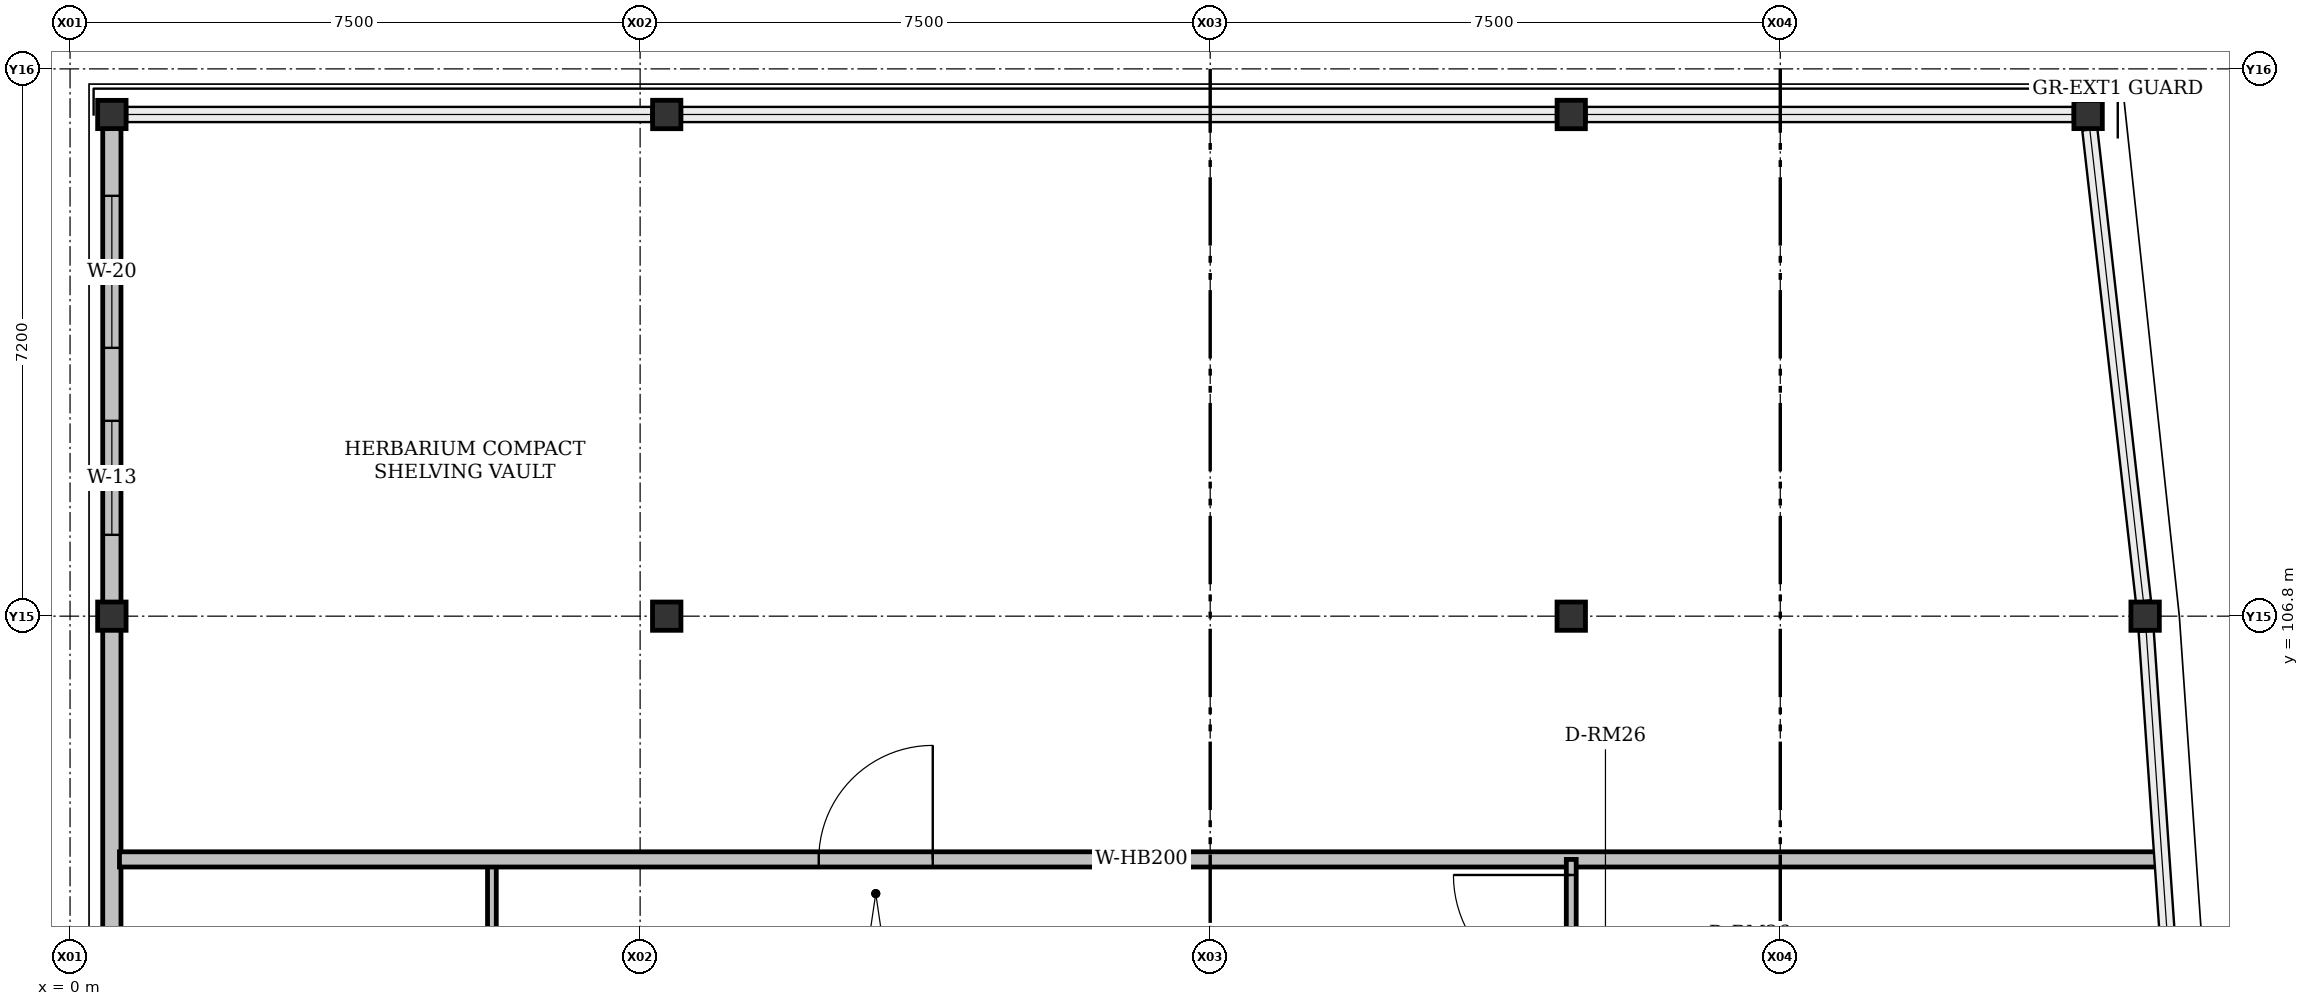
"""IFC4 building model, lengths in metres.
Left out: names, types, materials, properties, quantities, classifications, styles, units other than length and angle.
Written with IfcOpenShell. Run it as: python <this file> out.ifc"""

import sys

from ifc_helpers import new_model, si_unit, direction, frame, frame_2d, origin, origin_2d, place, context, subcontext, project, spatial, rectangle, i_section, extrude, element, fill, save


model = new_model("IFC4")
c1 = context("Model", 3, precision=1e-05, world=origin(), true_north=direction((0.0, 1.0)))
c2 = subcontext(c1, "Body", "Model", "MODEL_VIEW")
j1 = project(units=[si_unit("LENGTHUNIT", "METRE"), si_unit("PLANEANGLEUNIT", "RADIAN")], contexts=[c1])
p1 = place(None, origin())
s1 = spatial("IfcSite", under=j1, at=p1, CompositionType="ELEMENT")
p2 = place(p1, origin())
s2 = spatial("IfcBuilding", under=s1, at=p2, CompositionType="ELEMENT")
p3 = place(p2, frame((0.0, 0.0, 26.7)))
s3 = spatial("IfcBuildingStorey", under=s2, at=p3, CompositionType="ELEMENT", Elevation=26.7)
for number, where, z_axis, x_axis in (
    (1, (0.55, 106.8, 0.0), (0.0, 0.0, 1.0), (1.0, 0.0, 0.0)),
    (2, (7.85, 106.8, 0.0), (0.0, 0.0, 1.0), (1.0, 0.0, 0.0)),
    (3, (19.75, 106.8, 0.0), (0.0, 0.0, 1.0), (1.0, 0.0, 0.0)),
    (4, (27.3, 106.8, 0.0), (0.0, 0.0, 1.0), (1.0, 0.0, 0.0)),
    (5, (0.55, 113.4, 0.0), (0.0, 0.0, 1.0), (1.0, 0.0, 0.0)),
    (6, (7.85, 113.4, 0.0), (0.0, 0.0, 1.0), (0.0, 1.0, 0.0)),
    (7, (19.75, 113.4, 0.0), (0.0, 0.0, 1.0), (0.0, 1.0, 0.0)),
    (8, (26.55, 113.4, 0.0), (0.0, 0.0, 1.0), (1.0, 0.0, 0.0)),
):
    element("IfcColumn", number, at=place(p3, frame(where, z_axis=z_axis, x_axis=x_axis)), inside=s3, PredefinedType="COLUMN", context=c2, shape_type="SweptSolid", body=[
        extrude(i_section(OverallWidth=0.374, OverallDepth=0.372, WebThickness=0.016, FlangeThickness=0.026, FilletRadius=0.015, at=origin_2d()), origin(), (0.0, 0.0, 1.0), 4.2),
    ])
p4 = place(p3, frame((0.55, 99.6, 0.0), z_axis=(0.0, 0.0, 1.0), x_axis=(0.0, 1.0, 0.0)))
e9 = element("IfcWall", 9, at=p4, inside=s3, PredefinedType="SOLIDWALL", context=c2, shape_type="SweptSolid", body=[
    extrude(rectangle(XDim=7.2, YDim=0.24, at=frame_2d((3.6, 0.0))), origin(), (0.0, 0.0, 1.0), 3.557),
])
p5 = place(p3, frame((0.55, 106.8, 0.0), z_axis=(0.0, 0.0, 1.0), x_axis=(0.0, 1.0, 0.0)))
e10 = element("IfcWall", 10, at=p5, inside=s3, PredefinedType="SOLIDWALL", context=c2, shape_type="SweptSolid", body=[
    extrude(rectangle(XDim=6.6, YDim=0.24, at=frame_2d((3.3, 0.0))), origin(), (0.0, 0.0, 1.0), 3.557),
])
p6 = place(p5, frame((1.07, 0.0, 0.92)))
e11 = element("IfcOpeningElement", 11, at=p6, cuts=e10, PredefinedType="OPENING", context=c2, shape_type="SweptSolid", body=[
    extrude(rectangle(XDim=1.5, YDim=1.7, at=frame_2d((0.75, 0.85))), frame((0.0, 0.12, 0.0), z_axis=(0.0, -1.0, 0.0), x_axis=(1.0, 0.0, 0.0)), (0.0, 0.0, 1.0), 0.24),
])
p7 = place(p5, frame((3.53, 0.0, 0.92)))
e12 = element("IfcOpeningElement", 12, at=p7, cuts=e10, PredefinedType="OPENING", context=c2, shape_type="SweptSolid", body=[
    extrude(rectangle(XDim=2.0, YDim=1.35, at=frame_2d((1.0, 0.675))), frame((0.0, 0.12, 0.0), z_axis=(0.0, -1.0, 0.0), x_axis=(1.0, 0.0, 0.0)), (0.0, 0.0, 1.0), 0.24),
])
p8 = place(p3, frame((5.55, 85.2, 0.0), z_axis=(0.0, 0.0, 1.0), x_axis=(0.0, 1.0, 0.0)))
e13 = element("IfcWall", 13, at=p8, inside=s3, PredefinedType="PARTITIONING", context=c2, shape_type="SweptSolid", body=[
    extrude(rectangle(XDim=18.4, YDim=0.115, at=frame_2d((9.2, 0.0))), origin(), (0.0, 0.0, 1.0), 3.277),
])
p9 = place(p8, frame((8.56, 0.0, 0.0)))
e14 = element("IfcOpeningElement", 14, at=p9, cuts=e13, PredefinedType="OPENING", context=c2, shape_type="SweptSolid", body=[
    extrude(rectangle(XDim=1.28, YDim=2.25, at=frame_2d((0.64, 1.125))), frame((0.0, 0.058, 0.0), z_axis=(0.0, -1.0, 0.0), x_axis=(1.0, 0.0, 0.0)), (0.0, 0.0, 1.0), 0.115),
])
p10 = place(p8, frame((10.69, 0.0, 0.92)))
e15 = element("IfcOpeningElement", 15, at=p10, cuts=e13, PredefinedType="OPENING", context=c2, shape_type="SweptSolid", body=[
    extrude(rectangle(XDim=1.05, YDim=1.2, at=frame_2d((0.525, 0.6))), frame((0.0, 0.058, 0.0), z_axis=(0.0, -1.0, 0.0), x_axis=(1.0, 0.0, 0.0)), (0.0, 0.0, 1.0), 0.115),
])
p11 = place(p3, frame((0.65, 103.6, 0.0), z_axis=(0.0, 0.0, 1.0), x_axis=(1.0, 0.0, 0.0)))
e16 = element("IfcWall", 16, at=p11, inside=s3, PredefinedType="SOLIDWALL", context=c2, shape_type="SweptSolid", body=[
    extrude(rectangle(XDim=26.89, YDim=0.2, at=frame_2d((13.445, 0.0))), origin(), (0.0, 0.0, 1.0), 3.507),
])
p12 = place(p11, frame((9.2, 0.0, 0.0)))
e17 = element("IfcOpeningElement", 17, at=p12, cuts=e16, PredefinedType="OPENING", context=c2, shape_type="SweptSolid", body=[
    extrude(rectangle(XDim=1.5, YDim=2.3, at=frame_2d((0.75, 1.15))), frame((0.0, 0.1, 0.0), z_axis=(0.0, -1.0, 0.0), x_axis=(1.0, 0.0, 0.0)), (0.0, 0.0, 1.0), 0.2),
])
p13 = place(p3, frame((19.75, 99.782, 0.0), z_axis=(0.0, 0.0, 1.0), x_axis=(0.0, 1.0, 0.0)))
e18 = element("IfcWall", 18, at=p13, inside=s3, PredefinedType="PARTITIONING", context=c2, shape_type="SweptSolid", body=[
    extrude(rectangle(XDim=3.818, YDim=0.13, at=frame_2d((1.909, 0.0))), origin(), (0.0, 0.0, 1.0), 3.507),
])
p14 = place(p13, frame((2.063, 0.0, 0.0)))
e19 = element("IfcOpeningElement", 19, at=p14, cuts=e18, PredefinedType="OPENING", context=c2, shape_type="SweptSolid", body=[
    extrude(rectangle(XDim=1.55, YDim=2.3, at=frame_2d((0.775, 1.15))), frame((0.0, 0.065, 0.0), z_axis=(0.0, -1.0, 0.0), x_axis=(1.0, 0.0, 0.0)), (0.0, 0.0, 1.0), 0.13),
])
p15 = place(p6, origin())
e20 = element("IfcWindow", 20, at=p15, inside=s3, PartitioningType="SINGLE_PANEL", PredefinedType="WINDOW", context=c2, shape_type="SweptSolid", body=[
    extrude(rectangle(XDim=1.5, YDim=1.7, at=frame_2d((0.75, 0.85))), frame((0.0, 0.03, 0.0), z_axis=(0.0, -1.0, 0.0), x_axis=(1.0, 0.0, 0.0)), (0.0, 0.0, 1.0), 0.06),
])
fill(e11, e20)
p16 = place(p7, origin())
e21 = element("IfcWindow", 21, at=p16, inside=s3, PartitioningType="DOUBLE_PANEL_VERTICAL", PredefinedType="WINDOW", context=c2, shape_type="SweptSolid", body=[
    extrude(rectangle(XDim=2.0, YDim=1.35, at=frame_2d((1.0, 0.675))), frame((0.0, 0.03, 0.0), z_axis=(0.0, -1.0, 0.0), x_axis=(1.0, 0.0, 0.0)), (0.0, 0.0, 1.0), 0.06),
])
fill(e12, e21)
p17 = place(p12, origin())
e22 = element("IfcDoor", 22, at=p17, inside=s3, OperationType="SINGLE_SWING_RIGHT", PredefinedType="DOOR", context=c2, shape_type="SweptSolid", body=[
    extrude(rectangle(XDim=1.5, YDim=2.3, at=frame_2d((0.75, 1.15))), frame((0.0, 0.025, 0.0), z_axis=(0.0, -1.0, 0.0), x_axis=(1.0, 0.0, 0.0)), (0.0, 0.0, 1.0), 0.05),
])
fill(e17, e22)
p18 = place(p14, origin())
e23 = element("IfcDoor", 23, at=p18, inside=s3, OperationType="SINGLE_SWING_RIGHT", PredefinedType="DOOR", context=c2, shape_type="SweptSolid", body=[
    extrude(rectangle(XDim=1.55, YDim=2.3, at=frame_2d((0.775, 1.15))), frame((0.0, 0.025, 0.0), z_axis=(0.0, -1.0, 0.0), x_axis=(1.0, 0.0, 0.0)), (0.0, 0.0, 1.0), 0.05),
])
fill(e19, e23)
save(model, sys.argv[1])
